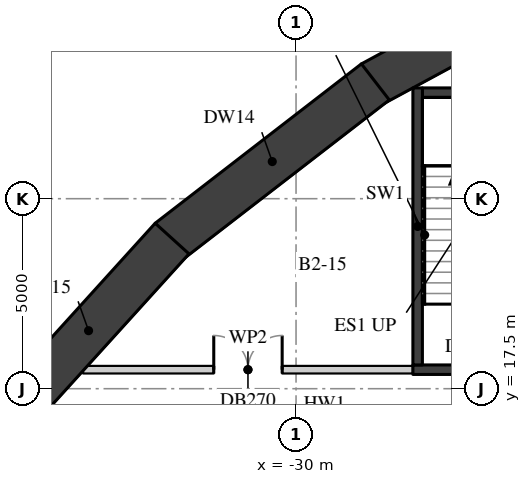
"""IFC4 building model, lengths in metres.
Left out: names, types, materials, properties, quantities, classifications, styles, units other than length and angle.
Written with IfcOpenShell. Run it as: python <this file> out.ifc"""

import sys

from ifc_helpers import new_model, si_unit, direction, frame, frame_2d, origin, place, context, subcontext, project, spatial, rectangle, extrude, element, fill, save


model = new_model("IFC4")
c1 = context("Model", 3, precision=1e-05, world=origin(), true_north=direction((0.0, 1.0)))
c2 = subcontext(c1, "Body", "Model", "MODEL_VIEW")
j1 = project(units=[si_unit("LENGTHUNIT", "METRE"), si_unit("PLANEANGLEUNIT", "RADIAN")], contexts=[c1])
p1 = place(None, origin())
s1 = spatial("IfcSite", under=j1, at=p1, CompositionType="ELEMENT")
p2 = place(p1, origin())
s2 = spatial("IfcBuilding", under=s1, at=p2, CompositionType="ELEMENT")
p3 = place(p2, frame((0.0, 0.0, -10.4)))
s3 = spatial("IfcBuildingStorey", under=s2, at=p3, CompositionType="ELEMENT", Elevation=-10.4)
p4 = place(p3, frame((-21.708, 28.921, 0.0), z_axis=(0.0, 0.0, 1.0), x_axis=(-0.879519330959, -0.475863159394, 0.0)))
e1 = element("IfcWall", 1, at=p4, inside=s3, PredefinedType="USERDEFINED", context=c2, shape_type="SweptSolid", body=[
    extrude(rectangle(XDim=7.155, YDim=1.2, at=frame_2d((3.577, 0.0))), origin(), (0.0, 0.0, 1.0), 5.2),
])
p5 = place(p3, frame((-27.913, 25.573, 0.0), z_axis=(0.0, 0.0, 1.0), x_axis=(-0.791286567459, -0.611445474396, 0.0)))
e2 = element("IfcWall", 2, at=p5, inside=s3, PredefinedType="USERDEFINED", context=c2, shape_type="SweptSolid", body=[
    extrude(rectangle(XDim=6.857, YDim=1.2, at=frame_2d((3.428, 0.0))), origin(), (0.0, 0.0, 1.0), 5.2),
])
p6 = place(p3, frame((-33.262, 21.451, 0.0), z_axis=(0.0, 0.0, 1.0), x_axis=(-0.671487423502, -0.741015951299, 0.0)))
e3 = element("IfcWall", 3, at=p6, inside=s3, PredefinedType="USERDEFINED", context=c2, shape_type="SweptSolid", body=[
    extrude(rectangle(XDim=6.545, YDim=1.2, at=frame_2d((3.272, 0.0))), origin(), (0.0, 0.0, 1.0), 5.2),
])
p7 = place(p3, frame((-35.605, 18.0, 0.0), z_axis=(0.0, 0.0, 1.0), x_axis=(1.0, 0.0, 0.0)))
e4 = element("IfcWall", 4, at=p7, inside=s3, PredefinedType="PARTITIONING", context=c2, shape_type="SweptSolid", body=[
    extrude(rectangle(XDim=8.68, YDim=0.2, at=frame_2d((4.34, 0.0))), origin(), (0.0, 0.0, 1.0), 4.75),
])
p8 = place(p7, frame((3.44, 0.0, 0.0)))
e5 = element("IfcOpeningElement", 5, at=p8, cuts=e4, PredefinedType="OPENING", context=c2, shape_type="SweptSolid", body=[
    extrude(rectangle(XDim=1.8, YDim=2.1, at=frame_2d((0.9, 1.05))), frame((0.0, 0.11, 0.0), z_axis=(0.0, -1.0, 0.0), x_axis=(1.0, 0.0, 0.0)), (0.0, 0.0, 1.0), 0.22),
])
p9 = place(p3, frame((-26.925, 18.0, 0.0), z_axis=(0.0, 0.0, 1.0), x_axis=(1.0, 0.0, 0.0)))
e6 = element("IfcWall", 6, at=p9, inside=s3, PredefinedType="SOLIDWALL", context=c2, shape_type="SweptSolid", body=[
    extrude(rectangle(XDim=4.35, YDim=0.25, at=frame_2d((2.175, 0.0))), origin(), (0.0, 0.0, 1.0), 4.75),
])
p10 = place(p9, frame((1.575, 0.0, 0.0)))
e7 = element("IfcOpeningElement", 7, at=p10, cuts=e6, PredefinedType="OPENING", context=c2, shape_type="SweptSolid", body=[
    extrude(rectangle(XDim=1.2, YDim=2.1, at=frame_2d((0.6, 1.05))), frame((0.0, 0.135, 0.0), z_axis=(0.0, -1.0, 0.0), x_axis=(1.0, 0.0, 0.0)), (0.0, 0.0, 1.0), 0.27),
])
p11 = place(p3, frame((-26.675, 25.29, 0.0), z_axis=(0.0, 0.0, 1.0), x_axis=(1.0, 0.0, 0.0)))
e8 = element("IfcWall", 8, at=p11, inside=s3, PredefinedType="SOLIDWALL", context=c2, shape_type="SweptSolid", body=[
    extrude(rectangle(XDim=4.1, YDim=0.25, at=frame_2d((2.05, 0.0))), origin(), (0.0, 0.0, 1.0), 4.75),
])
p12 = place(p3, frame((-26.8, 18.125, 0.0), z_axis=(0.0, 0.0, 1.0), x_axis=(0.0, 1.0, 0.0)))
e9 = element("IfcWall", 9, at=p12, inside=s3, PredefinedType="SOLIDWALL", context=c2, shape_type="SweptSolid", body=[
    extrude(rectangle(XDim=7.29, YDim=0.25, at=frame_2d((3.645, 0.0))), origin(), (0.0, 0.0, 1.0), 4.75),
])
p13 = place(p8, origin())
e10 = element("IfcDoor", 10, at=p13, inside=s3, OperationType="DOUBLE_DOOR_SINGLE_SWING", PredefinedType="DOOR", context=c2, shape_type="SweptSolid", body=[
    extrude(rectangle(XDim=1.8, YDim=2.1, at=frame_2d((0.9, 1.05))), frame((0.0, 0.025, 0.0), z_axis=(0.0, -1.0, 0.0), x_axis=(1.0, 0.0, 0.0)), (0.0, 0.0, 1.0), 0.05),
])
fill(e5, e10)
save(model, sys.argv[1])
